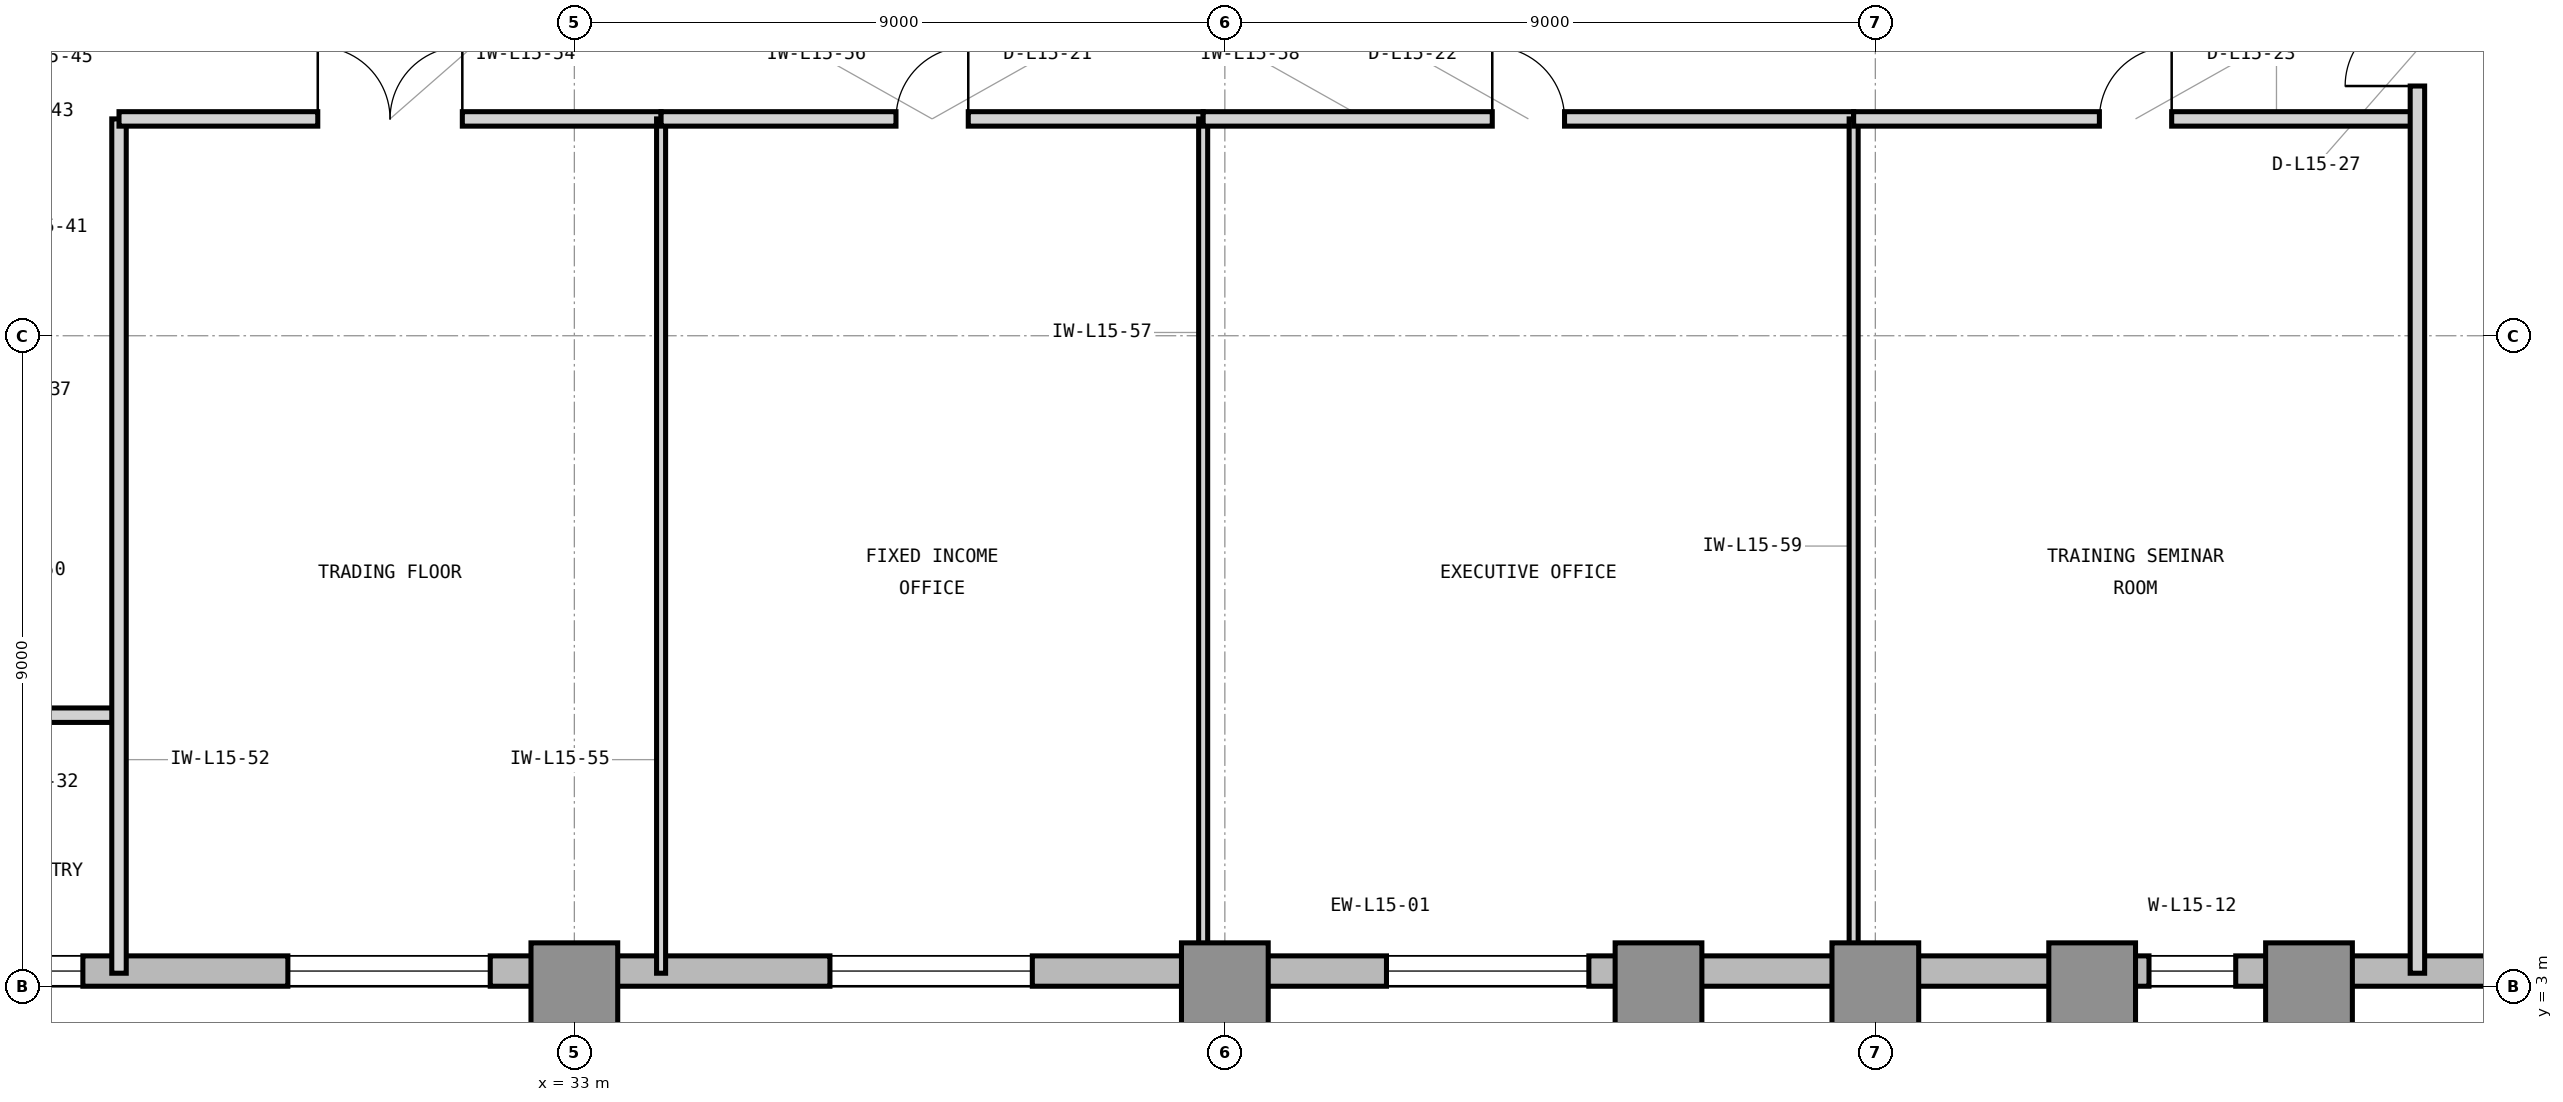
"""IFC4 building model, lengths in metres.
Left out: names, types, materials, properties, quantities, classifications, styles, units other than length and angle.
Written with IfcOpenShell. Run it as: python <this file> out.ifc"""

import sys

from ifc_helpers import new_model, si_unit, direction, frame, frame_2d, origin, origin_2d, place, context, subcontext, project, spatial, rectangle, extrude, element, fill, save


model = new_model("IFC4")
c1 = context("Model", 3, precision=1e-05, world=origin(), true_north=direction((0.0, 1.0)))
c2 = subcontext(c1, "Body", "Model", "MODEL_VIEW")
j1 = project(units=[si_unit("LENGTHUNIT", "METRE"), si_unit("PLANEANGLEUNIT", "RADIAN")], contexts=[c1])
p1 = place(None, origin())
s1 = spatial("IfcSite", under=j1, at=p1, CompositionType="ELEMENT")
p2 = place(p1, origin())
s2 = spatial("IfcBuilding", under=s1, at=p2, CompositionType="ELEMENT")
p3 = place(p2, frame((0.0, 0.0, 67.8)))
s3 = spatial("IfcBuildingStorey", under=s2, at=p3, CompositionType="ELEMENT", Elevation=67.8)
for number, where, z_axis, x_axis in (
    (1, (33.0, 3.0, 0.0), (0.0, 0.0, 1.0), (1.0, 0.0, 0.0)),
    (2, (42.0, 3.0, 0.0), (0.0, 0.0, 1.0), (1.0, 0.0, 0.0)),
    (3, (48.0, 3.0, 0.0), (0.0, 0.0, 1.0), (1.0, 0.0, 0.0)),
    (4, (51.0, 3.0, 0.0), (0.0, 0.0, 1.0), (1.0, 0.0, 0.0)),
    (5, (54.0, 3.0, 0.0), (0.0, 0.0, 1.0), (1.0, 0.0, 0.0)),
    (6, (57.0, 3.0, 0.0), (0.0, 0.0, 1.0), (1.0, 0.0, 0.0)),
):
    element("IfcColumn", number, at=place(p3, frame(where, z_axis=z_axis, x_axis=x_axis)), inside=s3, PredefinedType="COLUMN", context=c2, shape_type="SweptSolid", body=[
        extrude(rectangle(XDim=1.2, YDim=1.2, at=origin_2d()), origin(), (0.0, 0.0, 1.0), 4.2),
    ])
p4 = place(p3, frame((23.9, 3.21, 0.0), z_axis=(0.0, 0.0, 1.0), x_axis=(1.0, 0.0, 0.0)))
e7 = element("IfcWall", 7, at=p4, inside=s3, PredefinedType="STANDARD", context=c2, shape_type="SweptSolid", body=[
    extrude(rectangle(XDim=40.5, YDim=0.42, at=frame_2d((20.25, 0.0))), origin(), (0.0, 0.0, 1.0), 3.98),
])
p5 = place(p4, frame((1.1, 0.0, 0.85)))
e8 = element("IfcOpeningElement", 8, at=p5, cuts=e7, PredefinedType="OPENING", context=c2, shape_type="SweptSolid", body=[
    extrude(rectangle(XDim=1.2, YDim=2.45, at=frame_2d((0.6, 1.225))), frame((0.0, 0.22, 0.0), z_axis=(0.0, -1.0, 0.0), x_axis=(1.0, 0.0, 0.0)), (0.0, 0.0, 1.0), 0.44),
])
p6 = place(p4, frame((5.136, 0.0, 0.85)))
e9 = element("IfcOpeningElement", 9, at=p6, cuts=e7, PredefinedType="OPENING", context=c2, shape_type="SweptSolid", body=[
    extrude(rectangle(XDim=2.8, YDim=2.45, at=frame_2d((1.4, 1.225))), frame((0.0, 0.22, 0.0), z_axis=(0.0, -1.0, 0.0), x_axis=(1.0, 0.0, 0.0)), (0.0, 0.0, 1.0), 0.44),
])
p7 = place(p4, frame((12.636, 0.0, 0.85)))
e10 = element("IfcOpeningElement", 10, at=p7, cuts=e7, PredefinedType="OPENING", context=c2, shape_type="SweptSolid", body=[
    extrude(rectangle(XDim=2.8, YDim=2.45, at=frame_2d((1.4, 1.225))), frame((0.0, 0.22, 0.0), z_axis=(0.0, -1.0, 0.0), x_axis=(1.0, 0.0, 0.0)), (0.0, 0.0, 1.0), 0.44),
])
p8 = place(p4, frame((20.336, 0.0, 0.85)))
e11 = element("IfcOpeningElement", 11, at=p8, cuts=e7, PredefinedType="OPENING", context=c2, shape_type="SweptSolid", body=[
    extrude(rectangle(XDim=2.8, YDim=2.45, at=frame_2d((1.4, 1.225))), frame((0.0, 0.22, 0.0), z_axis=(0.0, -1.0, 0.0), x_axis=(1.0, 0.0, 0.0)), (0.0, 0.0, 1.0), 0.44),
])
p9 = place(p4, frame((30.886, 0.0, 0.85)))
e12 = element("IfcOpeningElement", 12, at=p9, cuts=e7, PredefinedType="OPENING", context=c2, shape_type="SweptSolid", body=[
    extrude(rectangle(XDim=1.2, YDim=2.45, at=frame_2d((0.6, 1.225))), frame((0.0, 0.22, 0.0), z_axis=(0.0, -1.0, 0.0), x_axis=(1.0, 0.0, 0.0)), (0.0, 0.0, 1.0), 0.44),
])
p10 = place(p3, frame((23.85, 6.75, 0.0), z_axis=(0.0, 0.0, 1.0), x_axis=(1.0, 0.0, 0.0)))
e13 = element("IfcWall", 13, at=p10, inside=s3, PredefinedType="PARTITIONING", context=c2, shape_type="SweptSolid", body=[
    extrude(rectangle(XDim=2.85, YDim=0.2, at=frame_2d((1.425, 0.0))), origin(), (0.0, 0.0, 1.0), 3.97),
])
p11 = place(p10, frame((0.7, 0.0, 0.0)))
e14 = element("IfcOpeningElement", 14, at=p11, cuts=e13, PredefinedType="OPENING", context=c2, shape_type="SweptSolid", body=[
    extrude(rectangle(XDim=1.0, YDim=2.15, at=frame_2d((0.5, 1.075))), frame((0.0, 0.11, 0.0), z_axis=(0.0, -1.0, 0.0), x_axis=(1.0, 0.0, 0.0)), (0.0, 0.0, 1.0), 0.22),
])
p12 = place(p3, frame((26.7, 3.18, 0.0), z_axis=(0.0, 0.0, 1.0), x_axis=(0.0, 1.0, 0.0)))
e15 = element("IfcWall", 15, at=p12, inside=s3, PredefinedType="PARTITIONING", context=c2, shape_type="SweptSolid", body=[
    extrude(rectangle(XDim=11.82, YDim=0.2, at=frame_2d((5.91, 0.0))), origin(), (0.0, 0.0, 1.0), 3.97),
])
p13 = place(p3, frame((26.7, 15.0, 0.0), z_axis=(0.0, 0.0, 1.0), x_axis=(1.0, 0.0, 0.0)))
e16 = element("IfcWall", 16, at=p13, inside=s3, PredefinedType="PARTITIONING", context=c2, shape_type="SweptSolid", body=[
    extrude(rectangle(XDim=7.5, YDim=0.2, at=frame_2d((3.75, 0.0))), origin(), (0.0, 0.0, 1.0), 3.426),
])
p14 = place(p13, frame((2.75, 0.0, 0.0)))
e17 = element("IfcOpeningElement", 17, at=p14, cuts=e16, PredefinedType="OPENING", context=c2, shape_type="SweptSolid", body=[
    extrude(rectangle(XDim=2.0, YDim=2.5, at=frame_2d((1.0, 1.25))), frame((0.0, 0.11, 0.0), z_axis=(0.0, -1.0, 0.0), x_axis=(1.0, 0.0, 0.0)), (0.0, 0.0, 1.0), 0.22),
])
p15 = place(p3, frame((34.2, 3.18, 0.0), z_axis=(0.0, 0.0, 1.0), x_axis=(0.0, 1.0, 0.0)))
e18 = element("IfcWall", 18, at=p15, inside=s3, PredefinedType="PARTITIONING", context=c2, shape_type="SweptSolid", body=[
    extrude(rectangle(XDim=11.82, YDim=0.125, at=frame_2d((5.91, 0.0))), origin(), (0.0, 0.0, 1.0), 3.97),
])
p16 = place(p3, frame((34.2, 15.0, 0.0), z_axis=(0.0, 0.0, 1.0), x_axis=(1.0, 0.0, 0.0)))
e19 = element("IfcWall", 19, at=p16, inside=s3, PredefinedType="PARTITIONING", context=c2, shape_type="SweptSolid", body=[
    extrude(rectangle(XDim=7.5, YDim=0.2, at=frame_2d((3.75, 0.0))), origin(), (0.0, 0.0, 1.0), 3.426),
])
p17 = place(p16, frame((3.25, 0.0, 0.0)))
e20 = element("IfcOpeningElement", 20, at=p17, cuts=e19, PredefinedType="OPENING", context=c2, shape_type="SweptSolid", body=[
    extrude(rectangle(XDim=1.0, YDim=2.15, at=frame_2d((0.5, 1.075))), frame((0.0, 0.11, 0.0), z_axis=(0.0, -1.0, 0.0), x_axis=(1.0, 0.0, 0.0)), (0.0, 0.0, 1.0), 0.22),
])
p18 = place(p3, frame((41.7, 3.18, 0.0), z_axis=(0.0, 0.0, 1.0), x_axis=(0.0, 1.0, 0.0)))
e21 = element("IfcWall", 21, at=p18, inside=s3, PredefinedType="PARTITIONING", context=c2, shape_type="SweptSolid", body=[
    extrude(rectangle(XDim=11.82, YDim=0.125, at=frame_2d((5.91, 0.0))), origin(), (0.0, 0.0, 1.0), 3.97),
])
p19 = place(p3, frame((41.7, 15.0, 0.0), z_axis=(0.0, 0.0, 1.0), x_axis=(1.0, 0.0, 0.0)))
e22 = element("IfcWall", 22, at=p19, inside=s3, PredefinedType="PARTITIONING", context=c2, shape_type="SweptSolid", body=[
    extrude(rectangle(XDim=9.0, YDim=0.2, at=frame_2d((4.5, 0.0))), origin(), (0.0, 0.0, 1.0), 3.426),
])
p20 = place(p19, frame((4.0, 0.0, 0.0)))
e23 = element("IfcOpeningElement", 23, at=p20, cuts=e22, PredefinedType="OPENING", context=c2, shape_type="SweptSolid", body=[
    extrude(rectangle(XDim=1.0, YDim=2.15, at=frame_2d((0.5, 1.075))), frame((0.0, 0.11, 0.0), z_axis=(0.0, -1.0, 0.0), x_axis=(1.0, 0.0, 0.0)), (0.0, 0.0, 1.0), 0.22),
])
p21 = place(p3, frame((50.7, 3.18, 0.0), z_axis=(0.0, 0.0, 1.0), x_axis=(0.0, 1.0, 0.0)))
e24 = element("IfcWall", 24, at=p21, inside=s3, PredefinedType="PARTITIONING", context=c2, shape_type="SweptSolid", body=[
    extrude(rectangle(XDim=11.82, YDim=0.125, at=frame_2d((5.91, 0.0))), origin(), (0.0, 0.0, 1.0), 3.97),
])
p22 = place(p3, frame((50.7, 15.0, 0.0), z_axis=(0.0, 0.0, 1.0), x_axis=(1.0, 0.0, 0.0)))
e25 = element("IfcWall", 25, at=p22, inside=s3, PredefinedType="PARTITIONING", context=c2, shape_type="SweptSolid", body=[
    extrude(rectangle(XDim=7.8, YDim=0.2, at=frame_2d((3.9, 0.0))), origin(), (0.0, 0.0, 1.0), 3.426),
])
p23 = place(p22, frame((3.4, 0.0, 0.0)))
e26 = element("IfcOpeningElement", 26, at=p23, cuts=e25, PredefinedType="OPENING", context=c2, shape_type="SweptSolid", body=[
    extrude(rectangle(XDim=1.0, YDim=2.15, at=frame_2d((0.5, 1.075))), frame((0.0, 0.11, 0.0), z_axis=(0.0, -1.0, 0.0), x_axis=(1.0, 0.0, 0.0)), (0.0, 0.0, 1.0), 0.22),
])
p24 = place(p3, frame((58.5, 3.18, 0.0), z_axis=(0.0, 0.0, 1.0), x_axis=(0.0, 1.0, 0.0)))
e27 = element("IfcWall", 27, at=p24, inside=s3, PredefinedType="PARTITIONING", context=c2, shape_type="SweptSolid", body=[
    extrude(rectangle(XDim=17.64, YDim=0.2, at=frame_2d((8.82, 0.0))), origin(), (0.0, 0.0, 1.0), 3.97),
])
p25 = place(p24, frame((12.275, 0.0, 0.0)))
e28 = element("IfcOpeningElement", 28, at=p25, cuts=e27, PredefinedType="OPENING", context=c2, shape_type="SweptSolid", body=[
    extrude(rectangle(XDim=1.0, YDim=2.15, at=frame_2d((0.5, 1.075))), frame((0.0, 0.11, 0.0), z_axis=(0.0, -1.0, 0.0), x_axis=(1.0, 0.0, 0.0)), (0.0, 0.0, 1.0), 0.22),
])
p26 = place(p14, origin())
e29 = element("IfcDoor", 29, at=p26, inside=s3, OperationType="DOUBLE_DOOR_SINGLE_SWING", PredefinedType="DOOR", context=c2, shape_type="SweptSolid", body=[
    extrude(rectangle(XDim=2.0, YDim=2.5, at=frame_2d((1.0, 1.25))), frame((0.0, 0.025, 0.0), z_axis=(0.0, -1.0, 0.0), x_axis=(1.0, 0.0, 0.0)), (0.0, 0.0, 1.0), 0.05),
])
fill(e17, e29)
p27 = place(p17, origin())
e30 = element("IfcDoor", 30, at=p27, inside=s3, OperationType="SINGLE_SWING_RIGHT", PredefinedType="DOOR", context=c2, shape_type="SweptSolid", body=[
    extrude(rectangle(XDim=1.0, YDim=2.15, at=frame_2d((0.5, 1.075))), frame((0.0, 0.025, 0.0), z_axis=(0.0, -1.0, 0.0), x_axis=(1.0, 0.0, 0.0)), (0.0, 0.0, 1.0), 0.05),
])
fill(e20, e30)
p28 = place(p20, origin())
e31 = element("IfcDoor", 31, at=p28, inside=s3, OperationType="SINGLE_SWING_LEFT", PredefinedType="DOOR", context=c2, shape_type="SweptSolid", body=[
    extrude(rectangle(XDim=1.0, YDim=2.15, at=frame_2d((0.5, 1.075))), frame((0.0, 0.025, 0.0), z_axis=(0.0, -1.0, 0.0), x_axis=(1.0, 0.0, 0.0)), (0.0, 0.0, 1.0), 0.05),
])
fill(e23, e31)
p29 = place(p23, origin())
e32 = element("IfcDoor", 32, at=p29, inside=s3, OperationType="SINGLE_SWING_RIGHT", PredefinedType="DOOR", context=c2, shape_type="SweptSolid", body=[
    extrude(rectangle(XDim=1.0, YDim=2.15, at=frame_2d((0.5, 1.075))), frame((0.0, 0.025, 0.0), z_axis=(0.0, -1.0, 0.0), x_axis=(1.0, 0.0, 0.0)), (0.0, 0.0, 1.0), 0.05),
])
fill(e26, e32)
p30 = place(p25, origin())
e33 = element("IfcDoor", 33, at=p30, inside=s3, OperationType="SINGLE_SWING_LEFT", PredefinedType="DOOR", context=c2, shape_type="SweptSolid", body=[
    extrude(rectangle(XDim=1.0, YDim=2.15, at=frame_2d((0.5, 1.075))), frame((0.0, 0.025, 0.0), z_axis=(0.0, -1.0, 0.0), x_axis=(1.0, 0.0, 0.0)), (0.0, 0.0, 1.0), 0.05),
])
fill(e28, e33)
p31 = place(p5, origin())
e34 = element("IfcWindow", 34, at=p31, inside=s3, PartitioningType="SINGLE_PANEL", PredefinedType="WINDOW", context=c2, shape_type="SweptSolid", body=[
    extrude(rectangle(XDim=1.2, YDim=2.45, at=frame_2d((0.6, 1.225))), frame((0.0, 0.11, 0.0), z_axis=(0.0, -1.0, 0.0), x_axis=(1.0, 0.0, 0.0)), (0.0, 0.0, 1.0), 0.06),
])
fill(e8, e34)
p32 = place(p6, origin())
e35 = element("IfcWindow", 35, at=p32, inside=s3, PartitioningType="SINGLE_PANEL", PredefinedType="WINDOW", context=c2, shape_type="SweptSolid", body=[
    extrude(rectangle(XDim=2.8, YDim=2.45, at=frame_2d((1.4, 1.225))), frame((0.0, 0.11, 0.0), z_axis=(0.0, -1.0, 0.0), x_axis=(1.0, 0.0, 0.0)), (0.0, 0.0, 1.0), 0.06),
])
fill(e9, e35)
p33 = place(p7, origin())
e36 = element("IfcWindow", 36, at=p33, inside=s3, PartitioningType="SINGLE_PANEL", PredefinedType="WINDOW", context=c2, shape_type="SweptSolid", body=[
    extrude(rectangle(XDim=2.8, YDim=2.45, at=frame_2d((1.4, 1.225))), frame((0.0, 0.11, 0.0), z_axis=(0.0, -1.0, 0.0), x_axis=(1.0, 0.0, 0.0)), (0.0, 0.0, 1.0), 0.06),
])
fill(e10, e36)
p34 = place(p8, origin())
e37 = element("IfcWindow", 37, at=p34, inside=s3, PartitioningType="SINGLE_PANEL", PredefinedType="WINDOW", context=c2, shape_type="SweptSolid", body=[
    extrude(rectangle(XDim=2.8, YDim=2.45, at=frame_2d((1.4, 1.225))), frame((0.0, 0.11, 0.0), z_axis=(0.0, -1.0, 0.0), x_axis=(1.0, 0.0, 0.0)), (0.0, 0.0, 1.0), 0.06),
])
fill(e11, e37)
p35 = place(p9, origin())
e38 = element("IfcWindow", 38, at=p35, inside=s3, PartitioningType="SINGLE_PANEL", PredefinedType="WINDOW", context=c2, shape_type="SweptSolid", body=[
    extrude(rectangle(XDim=1.2, YDim=2.45, at=frame_2d((0.6, 1.225))), frame((0.0, 0.11, 0.0), z_axis=(0.0, -1.0, 0.0), x_axis=(1.0, 0.0, 0.0)), (0.0, 0.0, 1.0), 0.06),
])
fill(e12, e38)
save(model, sys.argv[1])
